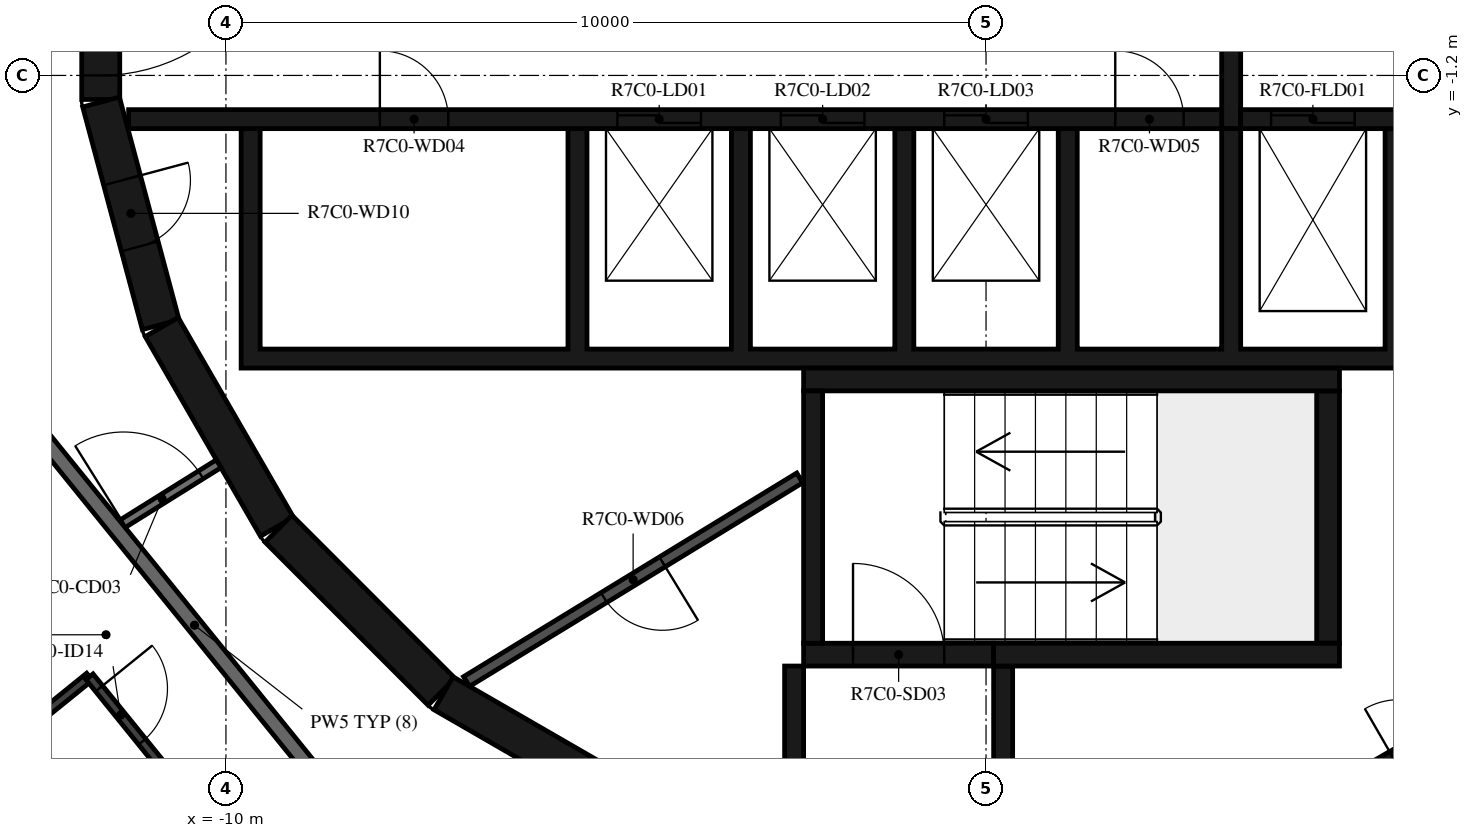
"""IFC4 building model, lengths in metres.
Left out: names, types, materials, properties, quantities, classifications, styles, units other than length and angle.
Written with IfcOpenShell. Run it as: python <this file> out.ifc"""

import sys

from ifc_helpers import new_model, si_unit, direction, frame, frame_2d, origin, place, context, subcontext, project, spatial, polyline, rectangle, outline, extrude, element, fill, save


model = new_model("IFC4")
c1 = context("Model", 3, precision=1e-05, world=origin(), true_north=direction((0.0, 1.0)))
c2 = subcontext(c1, "Body", "Model", "MODEL_VIEW")
j1 = project(units=[si_unit("LENGTHUNIT", "METRE"), si_unit("PLANEANGLEUNIT", "RADIAN")], contexts=[c1])
p1 = place(None, origin())
s1 = spatial("IfcSite", under=j1, at=p1, CompositionType="ELEMENT")
p2 = place(p1, origin())
s2 = spatial("IfcBuilding", under=s1, at=p2, CompositionType="ELEMENT")
p3 = place(p2, frame((0.0, 0.0, 284.4)))
s3 = spatial("IfcBuildingStorey", under=s2, at=p3, CompositionType="ELEMENT", Elevation=284.4)
p4 = place(p3, frame((4.51, -10.845, 0.0), z_axis=(0.0, 0.0, 1.0), x_axis=(0.865975092491, 0.500087131594, 0.0)))
e1 = element("IfcWall", 1, at=p4, inside=s3, PredefinedType="SHEAR", context=c2, shape_type="SweptSolid", body=[
    extrude(rectangle(XDim=3.033, YDim=0.5, at=frame_2d((1.516, 0.0))), origin(), (0.0, 0.0, 1.0), 3.12),
])
p5 = place(p4, frame((1.066, 0.0, 0.0)))
e2 = element("IfcOpeningElement", 2, at=p5, cuts=e1, PredefinedType="OPENING", context=c2, shape_type="SweptSolid", body=[
    extrude(rectangle(XDim=0.9, YDim=2.1, at=frame_2d((0.45, 1.05))), frame((0.0, 0.26, 0.0), z_axis=(0.0, -1.0, 0.0), x_axis=(1.0, 0.0, 0.0)), (0.0, 0.0, 1.0), 0.52),
])
p6 = place(p3, frame((-11.647, 1.516, 0.0), z_axis=(0.0, 0.0, 1.0), x_axis=(0.0, -1.0, 0.0)))
e3 = element("IfcWall", 3, at=p6, inside=s3, PredefinedType="SHEAR", context=c2, shape_type="SweptSolid", body=[
    extrude(rectangle(XDim=3.033, YDim=0.5, at=frame_2d((1.516, 0.0))), origin(), (0.0, 0.0, 1.0), 3.12),
])
p7 = place(p6, frame((0.316, 0.0, 0.0)))
e4 = element("IfcOpeningElement", 4, at=p7, cuts=e3, PredefinedType="OPENING", context=c2, shape_type="SweptSolid", body=[
    extrude(rectangle(XDim=2.4, YDim=2.1, at=frame_2d((1.2, 1.05))), frame((0.0, 0.26, 0.0), z_axis=(0.0, -1.0, 0.0), x_axis=(1.0, 0.0, 0.0)), (0.0, 0.0, 1.0), 0.52),
])
p8 = place(p3, frame((-11.643, -1.55, 0.0), z_axis=(0.0, 0.0, 1.0), x_axis=(0.258734743916, -0.965948410781, 0.0)))
e5 = element("IfcWall", 5, at=p8, inside=s3, PredefinedType="SHEAR", context=c2, shape_type="SweptSolid", body=[
    extrude(rectangle(XDim=3.033, YDim=0.5, at=frame_2d((1.516, 0.0))), origin(), (0.0, 0.0, 1.0), 3.12),
])
p9 = place(p8, frame((1.066, 0.0, 0.0)))
e6 = element("IfcOpeningElement", 6, at=p9, cuts=e5, PredefinedType="OPENING", context=c2, shape_type="SweptSolid", body=[
    extrude(rectangle(XDim=0.9, YDim=2.1, at=frame_2d((0.45, 1.05))), frame((0.0, 0.26, 0.0), z_axis=(0.0, -1.0, 0.0), x_axis=(1.0, 0.0, 0.0)), (0.0, 0.0, 1.0), 0.52),
])
p10 = place(p3, frame((-10.845, -4.51, 0.0), z_axis=(0.0, 0.0, 1.0), x_axis=(0.500087131594, -0.865975092491, 0.0)))
e7 = element("IfcWall", 7, at=p10, inside=s3, PredefinedType="SHEAR", context=c2, shape_type="SweptSolid", body=[
    extrude(rectangle(XDim=3.033, YDim=0.5, at=frame_2d((1.516, 0.0))), origin(), (0.0, 0.0, 1.0), 3.12),
])
p11 = place(p3, frame((-9.308, -7.164, 0.0), z_axis=(0.0, 0.0, 1.0), x_axis=(0.707106781187, -0.707106781187, 0.0)))
e8 = element("IfcWall", 8, at=p11, inside=s3, PredefinedType="SHEAR", context=c2, shape_type="SweptSolid", body=[
    extrude(rectangle(XDim=3.032, YDim=0.5, at=frame_2d((1.516, 0.0))), origin(), (0.0, 0.0, 1.0), 3.12),
])
p12 = place(p3, frame((-7.137, -9.329, 0.0), z_axis=(0.0, 0.0, 1.0), x_axis=(0.865975092491, -0.500087131594, 0.0)))
e9 = element("IfcWall", 9, at=p12, inside=s3, PredefinedType="SHEAR", context=c2, shape_type="SweptSolid", body=[
    extrude(rectangle(XDim=3.033, YDim=0.5, at=frame_2d((1.516, 0.0))), origin(), (0.0, 0.0, 1.0), 3.12),
])
p13 = place(p3, frame((-2.275, -8.67, 0.0), z_axis=(0.0, 0.0, 1.0), x_axis=(0.0, 1.0, 0.0)))
e10 = element("IfcWall", 10, at=p13, inside=s3, PredefinedType="SHEAR", context=c2, shape_type="SweptSolid", body=[
    extrude(rectangle(XDim=3.32, YDim=0.25, at=frame_2d((1.66, 0.0))), origin(), (0.0, 0.0, 1.0), 3.12),
])
p14 = place(p3, frame((-2.4, -5.2, 0.0), z_axis=(0.0, 0.0, 1.0), x_axis=(1.0, 0.0, 0.0)))
e11 = element("IfcWall", 11, at=p14, inside=s3, PredefinedType="SHEAR", context=c2, shape_type="SweptSolid", body=[
    extrude(rectangle(XDim=7.05, YDim=0.3, at=frame_2d((3.525, 0.0))), origin(), (0.0, 0.0, 1.0), 3.12),
])
p15 = place(p3, frame((4.5, -8.67, 0.0), z_axis=(0.0, 0.0, 1.0), x_axis=(0.0, 1.0, 0.0)))
e12 = element("IfcWall", 12, at=p15, inside=s3, PredefinedType="SHEAR", context=c2, shape_type="SweptSolid", body=[
    extrude(rectangle(XDim=3.32, YDim=0.3, at=frame_2d((1.66, 0.0))), origin(), (0.0, 0.0, 1.0), 3.12),
])
p16 = place(p3, frame((0.1, -8.82, 0.0), z_axis=(0.0, 0.0, 1.0), x_axis=(1.0, 0.0, 0.0)))
e13 = element("IfcWall", 13, at=p16, inside=s3, PredefinedType="SHEAR", context=c2, shape_type="SweptSolid", body=[
    extrude(rectangle(XDim=4.55, YDim=0.3, at=frame_2d((2.275, 0.0))), origin(), (0.0, 0.0, 1.0), 3.12),
])
p17 = place(p3, frame((-2.4, -8.82, 0.0), z_axis=(0.0, 0.0, 1.0), x_axis=(1.0, 0.0, 0.0)))
e14 = element("IfcWall", 14, at=p17, inside=s3, PredefinedType="SHEAR", context=c2, shape_type="SweptSolid", body=[
    extrude(rectangle(XDim=2.5, YDim=0.3, at=frame_2d((1.25, 0.0))), origin(), (0.0, 0.0, 1.0), 3.12),
])
p18 = place(p17, frame((0.65, 0.0, 0.0)))
e15 = element("IfcOpeningElement", 15, at=p18, cuts=e14, PredefinedType="OPENING", context=c2, shape_type="SweptSolid", body=[
    extrude(rectangle(XDim=1.2, YDim=2.1, at=frame_2d((0.6, 1.05))), frame((0.0, 0.16, 0.0), z_axis=(0.0, -1.0, 0.0), x_axis=(1.0, 0.0, 0.0)), (0.0, 0.0, 1.0), 0.32),
])
p19 = place(p3, frame((-2.525, -8.97, 0.0), z_axis=(0.0, 0.0, 1.0), x_axis=(0.0, -1.0, 0.0)))
e16 = element("IfcWall", 16, at=p19, inside=s3, PredefinedType="SHEAR", context=c2, shape_type="SweptSolid", body=[
    extrude(rectangle(XDim=2.11, YDim=0.25, at=frame_2d((1.055, 0.0))), origin(), (0.0, 0.0, 1.0), 3.12),
])
p20 = place(p3, frame((0.225, -8.97, 0.0), z_axis=(0.0, 0.0, 1.0), x_axis=(0.0, -1.0, 0.0)))
e17 = element("IfcWall", 17, at=p20, inside=s3, PredefinedType="SHEAR", context=c2, shape_type="SweptSolid", body=[
    extrude(rectangle(XDim=2.41, YDim=0.25, at=frame_2d((1.205, 0.0))), origin(), (0.0, 0.0, 1.0), 3.12),
])
p21 = place(p3, origin())
e18 = element("IfcWall", 18, at=p21, inside=s3, PredefinedType="SHEAR", context=c2, shape_type="SweptSolid", body=[
    extrude(outline(polyline([(9.8, -5.05), (9.8, -4.8), (9.8, -1.9), (9.55, -1.9), (9.55, -4.8), (7.65, -4.8), (7.65, -1.9), (7.4, -1.9), (7.4, -4.8), (5.5, -4.8), (5.5, -1.9), (5.25, -1.9), (5.25, -4.8), (3.35, -4.8), (3.35, -1.9), (3.1, -1.9), (3.1, -4.8), (1.2, -4.8), (1.2, -1.9), (0.95, -1.9), (0.95, -4.8), (-0.95, -4.8), (-0.95, -1.9), (-1.2, -1.9), (-1.2, -4.8), (-3.1, -4.8), (-3.1, -1.9), (-3.35, -1.9), (-3.35, -4.8), (-5.25, -4.8), (-5.25, -1.9), (-5.5, -1.9), (-5.5, -4.8), (-9.55, -4.8), (-9.55, -1.9), (-9.8, -1.9), (-9.8, -4.8), (-9.8, -5.05), (9.8, -5.05)])), origin(), (0.0, 0.0, 1.0), 3.12),
])
p22 = place(p3, frame((-11.28, -1.775, 0.0), z_axis=(0.0, 0.0, 1.0), x_axis=(1.0, 0.0, 0.0)))
e19 = element("IfcWall", 19, at=p22, inside=s3, PredefinedType="SHEAR", context=c2, shape_type="SweptSolid", body=[
    extrude(rectangle(XDim=14.38, YDim=0.25, at=frame_2d((7.19, 0.0))), origin(), (0.0, 0.0, 1.0), 3.12),
])
p23 = place(p22, frame((6.43, 0.0, 0.0)))
e20 = element("IfcOpeningElement", 20, at=p23, cuts=e19, PredefinedType="OPENING", context=c2, shape_type="SweptSolid", body=[
    extrude(rectangle(XDim=1.1, YDim=2.1, at=frame_2d((0.55, 1.05))), frame((0.0, 0.135, 0.0), z_axis=(0.0, -1.0, 0.0), x_axis=(1.0, 0.0, 0.0)), (0.0, 0.0, 1.0), 0.27),
])
p24 = place(p22, frame((8.58, 0.0, 0.0)))
e21 = element("IfcOpeningElement", 21, at=p24, cuts=e19, PredefinedType="OPENING", context=c2, shape_type="SweptSolid", body=[
    extrude(rectangle(XDim=1.1, YDim=2.1, at=frame_2d((0.55, 1.05))), frame((0.0, 0.135, 0.0), z_axis=(0.0, -1.0, 0.0), x_axis=(1.0, 0.0, 0.0)), (0.0, 0.0, 1.0), 0.27),
])
p25 = place(p22, frame((10.73, 0.0, 0.0)))
e22 = element("IfcOpeningElement", 22, at=p25, cuts=e19, PredefinedType="OPENING", context=c2, shape_type="SweptSolid", body=[
    extrude(rectangle(XDim=1.1, YDim=2.1, at=frame_2d((0.55, 1.05))), frame((0.0, 0.135, 0.0), z_axis=(0.0, -1.0, 0.0), x_axis=(1.0, 0.0, 0.0)), (0.0, 0.0, 1.0), 0.27),
])
p26 = place(p22, frame((3.305, 0.0, 0.0)))
e23 = element("IfcOpeningElement", 23, at=p26, cuts=e19, PredefinedType="OPENING", context=c2, shape_type="SweptSolid", body=[
    extrude(rectangle(XDim=0.9, YDim=2.1, at=frame_2d((0.45, 1.05))), frame((0.0, 0.135, 0.0), z_axis=(0.0, -1.0, 0.0), x_axis=(1.0, 0.0, 0.0)), (0.0, 0.0, 1.0), 0.27),
])
p27 = place(p22, frame((12.98, 0.0, 0.0)))
e24 = element("IfcOpeningElement", 24, at=p27, cuts=e19, PredefinedType="OPENING", context=c2, shape_type="SweptSolid", body=[
    extrude(rectangle(XDim=0.9, YDim=2.1, at=frame_2d((0.45, 1.05))), frame((0.0, 0.135, 0.0), z_axis=(0.0, -1.0, 0.0), x_axis=(1.0, 0.0, 0.0)), (0.0, 0.0, 1.0), 0.27),
])
p28 = place(p3, frame((3.35, -1.775, 0.0), z_axis=(0.0, 0.0, 1.0), x_axis=(1.0, 0.0, 0.0)))
e25 = element("IfcWall", 25, at=p28, inside=s3, PredefinedType="SHEAR", context=c2, shape_type="SweptSolid", body=[
    extrude(rectangle(XDim=7.93, YDim=0.25, at=frame_2d((3.965, 0.0))), origin(), (0.0, 0.0, 1.0), 3.12),
])
p29 = place(p28, frame((0.4, 0.0, 0.0)))
e26 = element("IfcOpeningElement", 26, at=p29, cuts=e25, PredefinedType="OPENING", context=c2, shape_type="SweptSolid", body=[
    extrude(rectangle(XDim=1.1, YDim=2.4, at=frame_2d((0.55, 1.2))), frame((0.0, 0.135, 0.0), z_axis=(0.0, -1.0, 0.0), x_axis=(1.0, 0.0, 0.0)), (0.0, 0.0, 1.0), 0.27),
])
p30 = place(p28, frame((2.55, 0.0, 0.0)))
e27 = element("IfcOpeningElement", 27, at=p30, cuts=e25, PredefinedType="OPENING", context=c2, shape_type="SweptSolid", body=[
    extrude(rectangle(XDim=1.1, YDim=2.4, at=frame_2d((0.55, 1.2))), frame((0.0, 0.135, 0.0), z_axis=(0.0, -1.0, 0.0), x_axis=(1.0, 0.0, 0.0)), (0.0, 0.0, 1.0), 0.27),
])
p31 = place(p28, frame((4.7, 0.0, 0.0)))
e28 = element("IfcOpeningElement", 28, at=p31, cuts=e25, PredefinedType="OPENING", context=c2, shape_type="SweptSolid", body=[
    extrude(rectangle(XDim=1.1, YDim=2.4, at=frame_2d((0.55, 1.2))), frame((0.0, 0.135, 0.0), z_axis=(0.0, -1.0, 0.0), x_axis=(1.0, 0.0, 0.0)), (0.0, 0.0, 1.0), 0.27),
])
p32 = place(p3, frame((3.225, -1.9, 0.0), z_axis=(0.0, 0.0, 1.0), x_axis=(0.0, 1.0, 0.0)))
e29 = element("IfcWall", 29, at=p32, inside=s3, PredefinedType="SHEAR", context=c2, shape_type="SweptSolid", body=[
    extrude(rectangle(XDim=3.8, YDim=0.25, at=frame_2d((1.9, 0.0))), origin(), (0.0, 0.0, 1.0), 3.12),
])
p33 = place(p3, frame((-2.451, -6.495, 0.0), z_axis=(0.0, 0.0, 1.0), x_axis=(-0.853250115418, -0.521501908471, 0.0)))
e30 = element("IfcWall", 30, at=p33, inside=s3, PredefinedType="PARTITIONING", context=c2, shape_type="SweptSolid", body=[
    extrude(rectangle(XDim=5.137, YDim=0.15, at=frame_2d((2.569, 0.0))), origin(), (0.0, 0.0, 1.0), 3.12),
])
p34 = place(p33, frame((2.119, 0.0, 0.0)))
e31 = element("IfcOpeningElement", 31, at=p34, cuts=e30, PredefinedType="OPENING", context=c2, shape_type="SweptSolid", body=[
    extrude(rectangle(XDim=0.9, YDim=2.1, at=frame_2d((0.45, 1.05))), frame((0.0, 0.085, 0.0), z_axis=(0.0, -1.0, 0.0), x_axis=(1.0, 0.0, 0.0)), (0.0, 0.0, 1.0), 0.17),
])
p35 = place(p3, frame((-11.449, -7.154, 0.0), z_axis=(0.0, 0.0, 1.0), x_axis=(0.848067047543, 0.529888934468, 0.0)))
e32 = element("IfcWall", 32, at=p35, inside=s3, PredefinedType="PARTITIONING", context=c2, shape_type="SweptSolid", body=[
    extrude(rectangle(XDim=1.596, YDim=0.12, at=frame_2d((0.798, 0.0))), origin(), (0.0, 0.0, 1.0), 3.12),
])
p36 = place(p35, frame((0.12, 0.0, 0.0)))
e33 = element("IfcOpeningElement", 33, at=p36, cuts=e32, PredefinedType="OPENING", context=c2, shape_type="SweptSolid", body=[
    extrude(rectangle(XDim=1.2, YDim=2.1, at=frame_2d((0.6, 1.05))), frame((0.0, 0.07, 0.0), z_axis=(0.0, -1.0, 0.0), x_axis=(1.0, 0.0, 0.0)), (0.0, 0.0, 1.0), 0.14),
])
p37 = place(p3, frame((-12.673, -5.643, 0.0), z_axis=(0.0, 0.0, 1.0), x_axis=(0.629302871585, -0.777160148113, 0.0)))
e34 = element("IfcWall", 34, at=p37, inside=s3, PredefinedType="STANDARD", context=c2, shape_type="SweptSolid", body=[
    extrude(rectangle(XDim=7.181, YDim=0.2, at=frame_2d((3.59, 0.0))), origin(), (0.0, 0.0, 1.0), 3.12),
])
p38 = place(p3, frame((-12.33, -9.544, 0.0), z_axis=(0.0, 0.0, 1.0), x_axis=(0.777046524115, 0.629443166109, 0.0)))
e35 = element("IfcWall", 35, at=p38, inside=s3, PredefinedType="PARTITIONING", context=c2, shape_type="SweptSolid", body=[
    extrude(rectangle(XDim=0.688, YDim=0.12, at=frame_2d((0.344, 0.0))), origin(), (0.0, 0.0, 1.0), 3.12),
])
p39 = place(p3, frame((-11.795, -9.111, 0.0), z_axis=(0.0, 0.0, 1.0), x_axis=(0.62936834401, -0.777107127466, 0.0)))
e36 = element("IfcWall", 36, at=p39, inside=s3, PredefinedType="PARTITIONING", context=c2, shape_type="SweptSolid", body=[
    extrude(rectangle(XDim=4.334, YDim=0.12, at=frame_2d((2.167, 0.0))), origin(), (0.0, 0.0, 1.0), 3.12),
])
p40 = place(p39, frame((0.2, 0.0, 0.0)))
e37 = element("IfcOpeningElement", 37, at=p40, cuts=e36, PredefinedType="OPENING", context=c2, shape_type="SweptSolid", body=[
    extrude(rectangle(XDim=0.9, YDim=2.1, at=frame_2d((0.45, 1.05))), frame((0.0, 0.07, 0.0), z_axis=(0.0, -1.0, 0.0), x_axis=(1.0, 0.0, 0.0)), (0.0, 0.0, 1.0), 0.14),
])
p41 = place(p3, frame((-11.185, -18.213, 0.0), z_axis=(0.0, 0.0, 1.0), x_axis=(-0.15642108221, 0.987690460134, 0.0)))
e38 = element("IfcWall", 38, at=p41, inside=s3, PredefinedType="PARTITIONING", context=c2, shape_type="SweptSolid", body=[
    extrude(rectangle(XDim=9.132, YDim=0.12, at=frame_2d((4.566, 0.0))), origin(), (0.0, 0.0, 1.0), 3.12),
])
p42 = place(p41, frame((1.781, 0.0, 0.0)))
e39 = element("IfcOpeningElement", 39, at=p42, cuts=e38, PredefinedType="OPENING", context=c2, shape_type="SweptSolid", body=[
    extrude(rectangle(XDim=0.9, YDim=2.1, at=frame_2d((0.45, 1.05))), frame((0.0, 0.07, 0.0), z_axis=(0.0, -1.0, 0.0), x_axis=(1.0, 0.0, 0.0)), (0.0, 0.0, 1.0), 0.14),
])
p43 = place(p18, origin())
e40 = element("IfcDoor", 40, at=p43, inside=s3, OperationType="SINGLE_SWING_LEFT", PredefinedType="DOOR", context=c2, shape_type="SweptSolid", body=[
    extrude(rectangle(XDim=1.2, YDim=2.1, at=frame_2d((0.6, 1.05))), frame((0.0, 0.025, 0.0), z_axis=(0.0, -1.0, 0.0), x_axis=(1.0, 0.0, 0.0)), (0.0, 0.0, 1.0), 0.05),
])
fill(e15, e40)
p44 = place(p7, origin())
e41 = element("IfcDoor", 41, at=p44, inside=s3, OperationType="DOUBLE_DOOR_SINGLE_SWING", PredefinedType="DOOR", context=c2, shape_type="SweptSolid", body=[
    extrude(rectangle(XDim=2.4, YDim=2.1, at=frame_2d((1.2, 1.05))), frame((0.0, 0.025, 0.0), z_axis=(0.0, -1.0, 0.0), x_axis=(1.0, 0.0, 0.0)), (0.0, 0.0, 1.0), 0.05),
])
fill(e4, e41)
p45 = place(p23, origin())
e42 = element("IfcDoor", 42, at=p45, inside=s3, OperationType="DOUBLE_DOOR_SLIDING", PredefinedType="DOOR", context=c2, shape_type="SweptSolid", body=[
    extrude(rectangle(XDim=1.1, YDim=2.1, at=frame_2d((0.55, 1.05))), frame((0.0, 0.025, 0.0), z_axis=(0.0, -1.0, 0.0), x_axis=(1.0, 0.0, 0.0)), (0.0, 0.0, 1.0), 0.05),
])
fill(e20, e42)
p46 = place(p24, origin())
e43 = element("IfcDoor", 43, at=p46, inside=s3, OperationType="DOUBLE_DOOR_SLIDING", PredefinedType="DOOR", context=c2, shape_type="SweptSolid", body=[
    extrude(rectangle(XDim=1.1, YDim=2.1, at=frame_2d((0.55, 1.05))), frame((0.0, 0.025, 0.0), z_axis=(0.0, -1.0, 0.0), x_axis=(1.0, 0.0, 0.0)), (0.0, 0.0, 1.0), 0.05),
])
fill(e21, e43)
p47 = place(p25, origin())
e44 = element("IfcDoor", 44, at=p47, inside=s3, OperationType="DOUBLE_DOOR_SLIDING", PredefinedType="DOOR", context=c2, shape_type="SweptSolid", body=[
    extrude(rectangle(XDim=1.1, YDim=2.1, at=frame_2d((0.55, 1.05))), frame((0.0, 0.025, 0.0), z_axis=(0.0, -1.0, 0.0), x_axis=(1.0, 0.0, 0.0)), (0.0, 0.0, 1.0), 0.05),
])
fill(e22, e44)
p48 = place(p29, origin())
e45 = element("IfcDoor", 45, at=p48, inside=s3, OperationType="DOUBLE_DOOR_SLIDING", PredefinedType="DOOR", context=c2, shape_type="SweptSolid", body=[
    extrude(rectangle(XDim=1.1, YDim=2.4, at=frame_2d((0.55, 1.2))), frame((0.0, 0.025, 0.0), z_axis=(0.0, -1.0, 0.0), x_axis=(1.0, 0.0, 0.0)), (0.0, 0.0, 1.0), 0.05),
])
fill(e26, e45)
p49 = place(p26, origin())
e46 = element("IfcDoor", 46, at=p49, inside=s3, OperationType="SINGLE_SWING_RIGHT", PredefinedType="DOOR", context=c2, shape_type="SweptSolid", body=[
    extrude(rectangle(XDim=0.9, YDim=2.1, at=frame_2d((0.45, 1.05))), frame((0.0, 0.025, 0.0), z_axis=(0.0, -1.0, 0.0), x_axis=(1.0, 0.0, 0.0)), (0.0, 0.0, 1.0), 0.05),
])
fill(e23, e46)
p50 = place(p27, origin())
e47 = element("IfcDoor", 47, at=p50, inside=s3, OperationType="SINGLE_SWING_LEFT", PredefinedType="DOOR", context=c2, shape_type="SweptSolid", body=[
    extrude(rectangle(XDim=0.9, YDim=2.1, at=frame_2d((0.45, 1.05))), frame((0.0, 0.025, 0.0), z_axis=(0.0, -1.0, 0.0), x_axis=(1.0, 0.0, 0.0)), (0.0, 0.0, 1.0), 0.05),
])
fill(e24, e47)
p51 = place(p34, origin())
e48 = element("IfcDoor", 48, at=p51, inside=s3, OperationType="SINGLE_SWING_RIGHT", PredefinedType="DOOR", context=c2, shape_type="SweptSolid", body=[
    extrude(rectangle(XDim=0.9, YDim=2.1, at=frame_2d((0.45, 1.05))), frame((0.0, 0.025, 0.0), z_axis=(0.0, -1.0, 0.0), x_axis=(1.0, 0.0, 0.0)), (0.0, 0.0, 1.0), 0.05),
])
fill(e31, e48)
p52 = place(p9, origin())
e49 = element("IfcDoor", 49, at=p52, inside=s3, OperationType="SINGLE_SWING_RIGHT", PredefinedType="DOOR", context=c2, shape_type="SweptSolid", body=[
    extrude(rectangle(XDim=0.9, YDim=2.1, at=frame_2d((0.45, 1.05))), frame((0.0, 0.025, 0.0), z_axis=(0.0, -1.0, 0.0), x_axis=(1.0, 0.0, 0.0)), (0.0, 0.0, 1.0), 0.05),
])
fill(e6, e49)
p53 = place(p40, origin())
e50 = element("IfcDoor", 50, at=p53, inside=s3, OperationType="SINGLE_SWING_RIGHT", PredefinedType="DOOR", context=c2, shape_type="SweptSolid", body=[
    extrude(rectangle(XDim=0.9, YDim=2.1, at=frame_2d((0.45, 1.05))), frame((0.0, 0.025, 0.0), z_axis=(0.0, -1.0, 0.0), x_axis=(1.0, 0.0, 0.0)), (0.0, 0.0, 1.0), 0.05),
])
fill(e37, e50)
p54 = place(p36, origin())
e51 = element("IfcDoor", 51, at=p54, inside=s3, OperationType="DOUBLE_DOOR_SINGLE_SWING", PredefinedType="DOOR", context=c2, shape_type="SweptSolid", body=[
    extrude(rectangle(XDim=1.2, YDim=2.1, at=frame_2d((0.6, 1.05))), frame((0.0, 0.025, 0.0), z_axis=(0.0, -1.0, 0.0), x_axis=(1.0, 0.0, 0.0)), (0.0, 0.0, 1.0), 0.05),
])
fill(e33, e51)
save(model, sys.argv[1])
